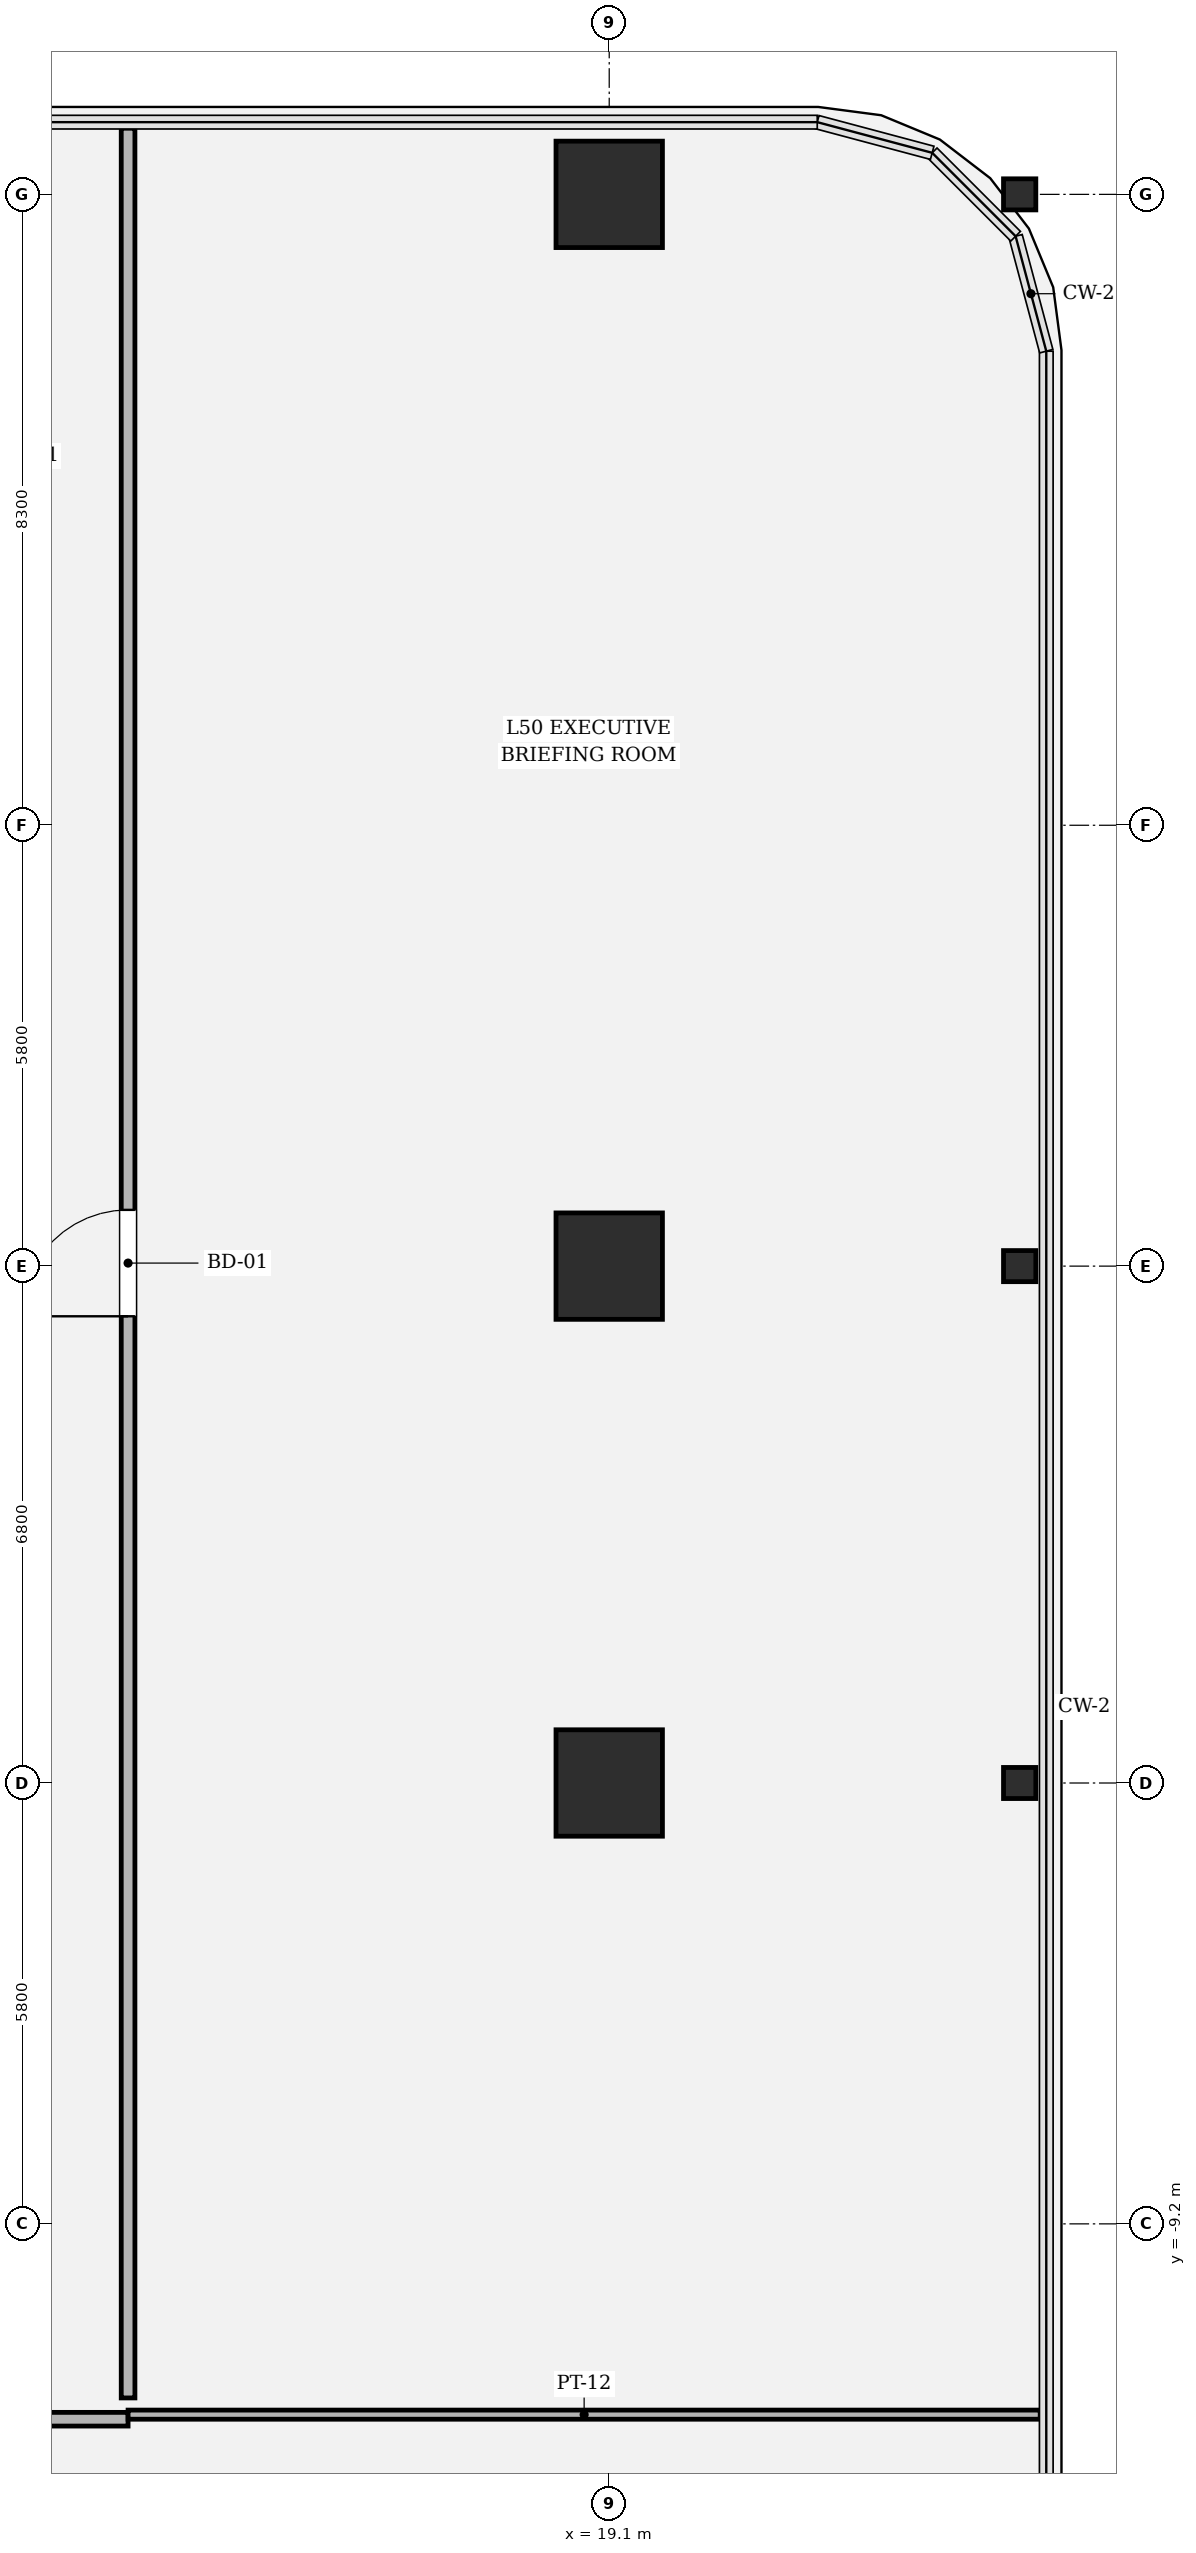
"""IFC4 building model, lengths in metres.
Left out: names, types, materials, properties, quantities, classifications, styles, units other than length and angle.
Written with IfcOpenShell. Run it as: python <this file> out.ifc"""

import sys

from ifc_helpers import new_model, si_unit, direction, frame, frame_2d, origin, origin_2d, place, context, subcontext, project, spatial, rectangle, hollow_rectangle, i_section, extrude, element, fill, save


model = new_model("IFC4")
c1 = context("Model", 3, precision=1e-05, world=origin(), true_north=direction((0.0, 1.0)))
c2 = subcontext(c1, "Body", "Model", "MODEL_VIEW")
j1 = project(units=[si_unit("LENGTHUNIT", "METRE"), si_unit("PLANEANGLEUNIT", "RADIAN")], contexts=[c1])
p1 = place(None, origin())
s1 = spatial("IfcSite", under=j1, at=p1, CompositionType="ELEMENT")
p2 = place(p1, origin())
s2 = spatial("IfcBuilding", under=s1, at=p2, CompositionType="ELEMENT")
p3 = place(p2, frame((0.0, 0.0, 212.7)))
s3 = spatial("IfcBuildingStorey", under=s2, at=p3, CompositionType="ELEMENT", Elevation=212.7)
for number, where, z_axis, x_axis in (
    (1, (19.1, -3.4, 0.0), (0.0, 0.0, 1.0), (1.0, 0.0, 0.0)),
    (2, (19.1, 3.4, 0.0), (0.0, 0.0, 1.0), (1.0, 0.0, 0.0)),
    (3, (19.1, 17.5, 0.0), (0.0, 0.0, 1.0), (1.0, 0.0, 0.0)),
):
    element("IfcColumn", number, at=place(p3, frame(where, z_axis=z_axis, x_axis=x_axis)), inside=s3, PredefinedType="COLUMN", context=c2, shape_type="SweptSolid", body=[
        extrude(hollow_rectangle(XDim=1.4, YDim=1.4, WallThickness=0.042, at=origin_2d()), origin(), (0.0, 0.0, 1.0), 4.05),
    ])
for number, where, z_axis, x_axis in (
    (4, (24.5, -3.4, 0.0), (0.0, 0.0, 1.0), (0.0, 1.0, 0.0)),
    (5, (24.5, 3.4, 0.0), (0.0, 0.0, 1.0), (0.0, 1.0, 0.0)),
    (6, (24.5, 17.5, 0.0), (0.0, 0.0, 1.0), (0.0, 1.0, 0.0)),
):
    element("IfcColumn", number, at=place(p3, frame(where, z_axis=z_axis, x_axis=x_axis)), inside=s3, PredefinedType="COLUMN", context=c2, shape_type="SweptSolid", body=[
        extrude(i_section(OverallWidth=0.409, OverallDepth=0.425, WebThickness=0.032, FlangeThickness=0.052, FilletRadius=0.018, at=origin_2d()), origin(), (0.0, 0.0, 1.0), 4.048),
    ])
p4 = place(p3, frame((-12.77, -11.77, 0.0), z_axis=(0.0, 0.0, 1.0), x_axis=(1.0, 0.0, 0.0)))
e7 = element("IfcWall", 7, at=p4, inside=s3, PredefinedType="PARTITIONING", context=c2, shape_type="SweptSolid", body=[
    extrude(rectangle(XDim=25.54, YDim=0.18, at=frame_2d((12.77, 0.0))), origin(), (0.0, 0.0, 1.0), 3.174),
])
p5 = place(p4, frame((12.07, 0.0, 0.0)))
e8 = element("IfcOpeningElement", 8, at=p5, cuts=e7, PredefinedType="OPENING", context=c2, shape_type="SweptSolid", body=[
    extrude(rectangle(XDim=1.4, YDim=2.25, at=frame_2d((0.7, 1.125))), frame((0.0, 0.1, 0.0), z_axis=(0.0, -1.0, 0.0), x_axis=(1.0, 0.0, 0.0)), (0.0, 0.0, 1.0), 0.2),
])
p6 = place(p3, frame((12.77, -11.71, 0.0), z_axis=(0.0, 0.0, 1.0), x_axis=(1.0, 0.0, 0.0)))
e9 = element("IfcWall", 9, at=p6, inside=s3, PredefinedType="PARTITIONING", context=c2, shape_type="SweptSolid", body=[
    extrude(rectangle(XDim=12.0, YDim=0.12, at=frame_2d((6.0, 0.0))), origin(), (0.0, 0.0, 1.0), 2.544),
])
p7 = place(p3, frame((12.77, -11.49, 0.0), z_axis=(0.0, 0.0, 1.0), x_axis=(0.0, 1.0, 0.0)))
e10 = element("IfcWall", 10, at=p7, inside=s3, PredefinedType="PARTITIONING", context=c2, shape_type="SweptSolid", body=[
    extrude(rectangle(XDim=29.86, YDim=0.18, at=frame_2d((14.93, 0.0))), origin(), (0.0, 0.0, 1.0), 3.174),
])
p8 = place(p7, frame((14.23, 0.0, 0.0)))
e11 = element("IfcOpeningElement", 11, at=p8, cuts=e10, PredefinedType="OPENING", context=c2, shape_type="SweptSolid", body=[
    extrude(rectangle(XDim=1.4, YDim=2.25, at=frame_2d((0.7, 1.125))), frame((0.0, 0.1, 0.0), z_axis=(0.0, -1.0, 0.0), x_axis=(1.0, 0.0, 0.0)), (0.0, 0.0, 1.0), 0.2),
])
p9 = place(p8, origin())
e12 = element("IfcDoor", 12, at=p9, inside=s3, OperationType="SINGLE_SWING_LEFT", PredefinedType="DOOR", context=c2, shape_type="SweptSolid", body=[
    extrude(rectangle(XDim=1.4, YDim=2.25, at=frame_2d((0.7, 1.125))), frame((0.0, 0.025, 0.0), z_axis=(0.0, -1.0, 0.0), x_axis=(1.0, 0.0, 0.0)), (0.0, 0.0, 1.0), 0.05),
])
fill(e11, e12)
save(model, sys.argv[1])
